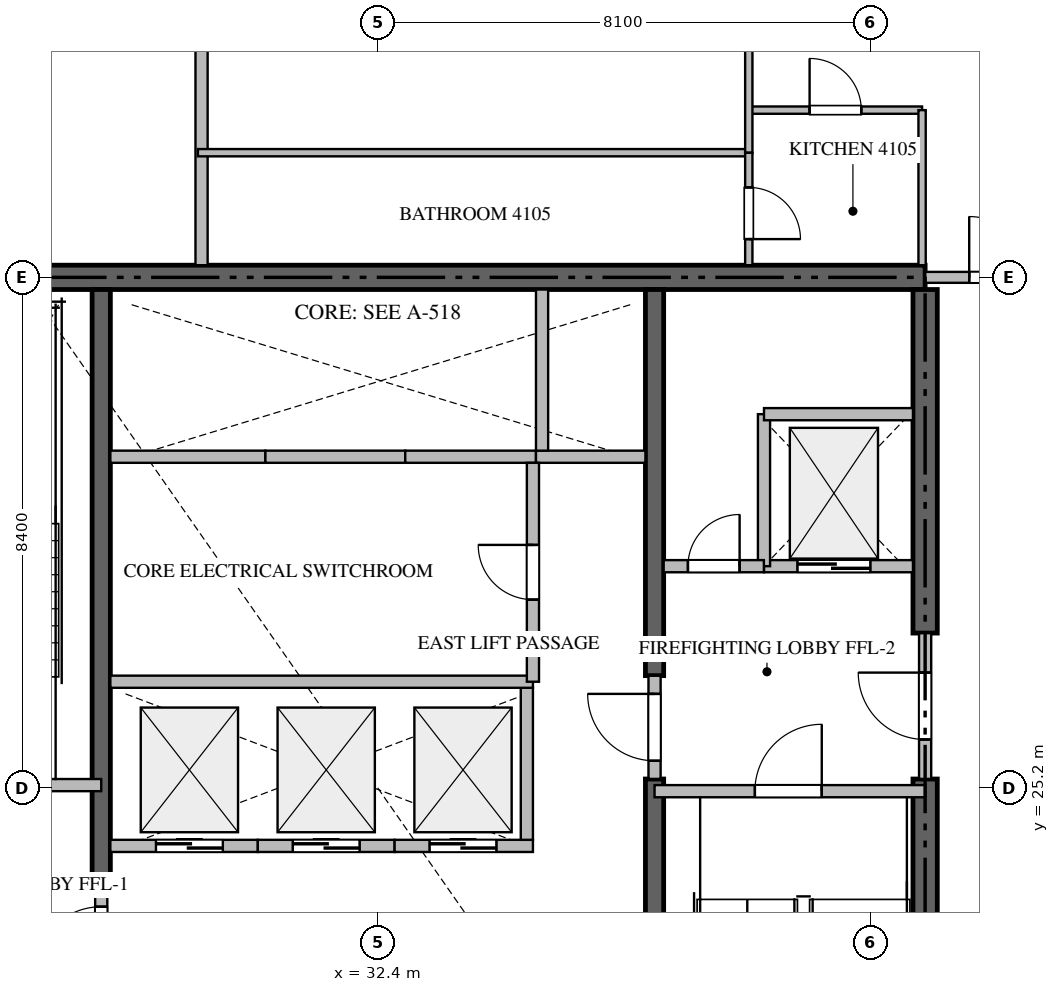
"""IFC4 building model, lengths in metres.
Left out: names, types, materials, properties, quantities, classifications, styles, units other than length and angle.
Written with IfcOpenShell. Run it as: python <this file> out.ifc"""

import sys

from ifc_helpers import new_model, si_unit, direction, frame, frame_2d, origin, place, context, subcontext, project, spatial, rectangle, extrude, source, transform, mapped, element, fill, save


model = new_model("IFC4")
c1 = context("Model", 3, precision=1e-05, world=origin(), true_north=direction((0.0, 1.0)))
c2 = subcontext(c1, "Body", "Model", "MODEL_VIEW")
j1 = project(units=[si_unit("LENGTHUNIT", "METRE"), si_unit("PLANEANGLEUNIT", "RADIAN")], contexts=[c1])
p1 = place(None, origin())
s1 = spatial("IfcSite", under=j1, at=p1, CompositionType="ELEMENT")
p2 = place(p1, origin())
s2 = spatial("IfcBuilding", under=s1, at=p2, CompositionType="ELEMENT")
p3 = place(p2, frame((0.0, 0.0, 165.15)))
s3 = spatial("IfcBuildingStorey", under=s2, at=p3, CompositionType="ELEMENT", Elevation=165.15)
p4 = place(p3, frame((41.4, 33.6, -0.26), z_axis=(0.0, 0.0, 1.0), x_axis=(-1.0, 0.0, 0.0)))
e1 = element("IfcWall", 1, at=p4, inside=s3, PredefinedType="SHEAR", context=c2, shape_type="SweptSolid", body=[
    extrude(rectangle(XDim=18.0, YDim=0.4, at=frame_2d((9.0, 0.0))), origin(), (0.0, 0.0, 1.0), 3.748),
])
p5 = place(p3, frame((41.4, 17.0, -0.26), z_axis=(0.0, 0.0, 1.0), x_axis=(0.0, 1.0, 0.0)))
e2 = element("IfcWall", 2, at=p5, inside=s3, PredefinedType="SHEAR", context=c2, shape_type="SweptSolid", body=[
    extrude(rectangle(XDim=8.35, YDim=0.4, at=frame_2d((4.175, 0.0))), origin(), (0.0, 0.0, 1.0), 3.748),
])
p6 = place(p3, frame((41.4, 27.75, -0.26), z_axis=(0.0, 0.0, 1.0), x_axis=(0.0, 1.0, 0.0)))
e3 = element("IfcWall", 3, at=p6, inside=s3, PredefinedType="SHEAR", context=c2, shape_type="SweptSolid", body=[
    extrude(rectangle(XDim=5.65, YDim=0.4, at=frame_2d((2.825, 0.0))), origin(), (0.0, 0.0, 1.0), 3.748),
])
p7 = place(p3, frame((27.85, 23.55, -0.26), z_axis=(0.0, 0.0, 1.0), x_axis=(0.0, 1.0, 0.0)))
e4 = element("IfcWall", 4, at=p7, inside=s3, PredefinedType="SHEAR", context=c2, shape_type="SweptSolid", body=[
    extrude(rectangle(XDim=9.85, YDim=0.3, at=frame_2d((4.925, 0.0))), origin(), (0.0, 0.0, 1.0), 3.748),
])
p8 = place(p3, frame((36.95, 17.0, -0.26), z_axis=(0.0, 0.0, 1.0), x_axis=(0.0, 1.0, 0.0)))
e5 = element("IfcWall", 5, at=p8, inside=s3, PredefinedType="SHEAR", context=c2, shape_type="SweptSolid", body=[
    extrude(rectangle(XDim=8.35, YDim=0.3, at=frame_2d((4.175, 0.0))), origin(), (0.0, 0.0, 1.0), 3.748),
])
p9 = place(p3, frame((36.95, 27.05, -0.26), z_axis=(0.0, 0.0, 1.0), x_axis=(0.0, 1.0, 0.0)))
e6 = element("IfcWall", 6, at=p9, inside=s3, PredefinedType="SHEAR", context=c2, shape_type="SweptSolid", body=[
    extrude(rectangle(XDim=6.35, YDim=0.3, at=frame_2d((3.175, 0.0))), origin(), (0.0, 0.0, 1.0), 3.748),
])
p10 = place(p3, frame((23.4, 25.25, 0.0), z_axis=(0.0, 0.0, 1.0), x_axis=(1.0, 0.0, 0.0)))
e7 = element("IfcWall", 7, at=p10, inside=s3, PredefinedType="STANDARD", context=c2, shape_type="SweptSolid", body=[
    extrude(rectangle(XDim=4.45, YDim=0.2, at=frame_2d((2.225, 0.0))), origin(), (0.0, 0.0, 1.0), 3.49),
])
p11 = place(p10, frame((1.65, 0.0, 0.0)))
e8 = element("IfcOpeningElement", 8, at=p11, cuts=e7, PredefinedType="OPENING", context=c2, shape_type="SweptSolid", body=[
    extrude(rectangle(XDim=1.1, YDim=2.15, at=frame_2d((0.55, 1.075))), frame((0.0, 0.11, 0.0), z_axis=(0.0, -1.0, 0.0), x_axis=(1.0, 0.0, 0.0)), (0.0, 0.0, 1.0), 0.22),
])
p12 = place(p3, frame((36.95, 25.15, 0.0), z_axis=(0.0, 0.0, 1.0), x_axis=(1.0, 0.0, 0.0)))
e9 = element("IfcWall", 9, at=p12, inside=s3, PredefinedType="STANDARD", context=c2, shape_type="SweptSolid", body=[
    extrude(rectangle(XDim=4.45, YDim=0.2, at=frame_2d((2.225, 0.0))), origin(), (0.0, 0.0, 1.0), 3.49),
])
p13 = place(p12, frame((1.65, 0.0, 0.0)))
e10 = element("IfcOpeningElement", 10, at=p13, cuts=e9, PredefinedType="OPENING", context=c2, shape_type="SweptSolid", body=[
    extrude(rectangle(XDim=1.1, YDim=2.15, at=frame_2d((0.55, 1.075))), frame((0.0, 0.11, 0.0), z_axis=(0.0, -1.0, 0.0), x_axis=(1.0, 0.0, 0.0)), (0.0, 0.0, 1.0), 0.22),
])
p14 = place(p3, frame((38.75, 28.85, 0.0), z_axis=(0.0, 0.0, 1.0), x_axis=(1.0, 0.0, 0.0)))
e11 = element("IfcWall", 11, at=p14, inside=s3, PredefinedType="STANDARD", context=c2, shape_type="SweptSolid", body=[
    extrude(rectangle(XDim=2.45, YDim=0.2, at=frame_2d((1.225, 0.0))), origin(), (0.0, 0.0, 1.0), 3.49),
])
p15 = place(p14, frame((0.55, 0.0, 0.0)))
e12 = element("IfcOpeningElement", 12, at=p15, cuts=e11, PredefinedType="OPENING", context=c2, shape_type="SweptSolid", body=[
    extrude(rectangle(XDim=1.2, YDim=2.2, at=frame_2d((0.6, 1.1))), frame((0.0, 0.11, 0.0), z_axis=(0.0, -1.0, 0.0), x_axis=(1.0, 0.0, 0.0)), (0.0, 0.0, 1.0), 0.22),
])
p16 = place(p3, frame((28.0, 24.25, 0.0), z_axis=(0.0, 0.0, 1.0), x_axis=(1.0, 0.0, 0.0)))
e13 = element("IfcWall", 13, at=p16, inside=s3, PredefinedType="STANDARD", context=c2, shape_type="SweptSolid", body=[
    extrude(rectangle(XDim=2.425, YDim=0.2, at=frame_2d((1.212, 0.0))), origin(), (0.0, 0.0, 1.0), 3.49),
])
p17 = place(p16, frame((0.75, 0.0, 0.0)))
e14 = element("IfcOpeningElement", 14, at=p17, cuts=e13, PredefinedType="OPENING", context=c2, shape_type="SweptSolid", body=[
    extrude(rectangle(XDim=1.1, YDim=2.2, at=frame_2d((0.55, 1.1))), frame((0.0, 0.11, 0.0), z_axis=(0.0, -1.0, 0.0), x_axis=(1.0, 0.0, 0.0)), (0.0, 0.0, 1.0), 0.22),
])
p18 = place(p3, frame((30.425, 24.25, 0.0), z_axis=(0.0, 0.0, 1.0), x_axis=(1.0, 0.0, 0.0)))
e15 = element("IfcWall", 15, at=p18, inside=s3, PredefinedType="STANDARD", context=c2, shape_type="SweptSolid", body=[
    extrude(rectangle(XDim=2.25, YDim=0.2, at=frame_2d((1.125, 0.0))), origin(), (0.0, 0.0, 1.0), 3.49),
])
p19 = place(p18, frame((0.575, 0.0, 0.0)))
e16 = element("IfcOpeningElement", 16, at=p19, cuts=e15, PredefinedType="OPENING", context=c2, shape_type="SweptSolid", body=[
    extrude(rectangle(XDim=1.1, YDim=2.2, at=frame_2d((0.55, 1.1))), frame((0.0, 0.11, 0.0), z_axis=(0.0, -1.0, 0.0), x_axis=(1.0, 0.0, 0.0)), (0.0, 0.0, 1.0), 0.22),
])
p20 = place(p3, frame((32.675, 24.25, 0.0), z_axis=(0.0, 0.0, 1.0), x_axis=(1.0, 0.0, 0.0)))
e17 = element("IfcWall", 17, at=p20, inside=s3, PredefinedType="STANDARD", context=c2, shape_type="SweptSolid", body=[
    extrude(rectangle(XDim=2.275, YDim=0.2, at=frame_2d((1.137, 0.0))), origin(), (0.0, 0.0, 1.0), 3.49),
])
p21 = place(p20, frame((0.575, 0.0, 0.0)))
e18 = element("IfcOpeningElement", 18, at=p21, cuts=e17, PredefinedType="OPENING", context=c2, shape_type="SweptSolid", body=[
    extrude(rectangle(XDim=1.1, YDim=2.2, at=frame_2d((0.55, 1.1))), frame((0.0, 0.11, 0.0), z_axis=(0.0, -1.0, 0.0), x_axis=(1.0, 0.0, 0.0)), (0.0, 0.0, 1.0), 0.22),
])
p22 = place(p3, frame((34.85, 24.35, 0.0), z_axis=(0.0, 0.0, 1.0), x_axis=(0.0, 1.0, 0.0)))
e19 = element("IfcWall", 19, at=p22, inside=s3, PredefinedType="STANDARD", context=c2, shape_type="SweptSolid", body=[
    extrude(rectangle(XDim=2.5, YDim=0.2, at=frame_2d((1.25, 0.0))), origin(), (0.0, 0.0, 1.0), 3.49),
])
p23 = place(p3, frame((28.0, 30.65, 0.0), z_axis=(0.0, 0.0, 1.0), x_axis=(1.0, 0.0, 0.0)))
e20 = element("IfcWall", 20, at=p23, inside=s3, PredefinedType="STANDARD", context=c2, shape_type="SweptSolid", body=[
    extrude(rectangle(XDim=2.55, YDim=0.2, at=frame_2d((1.275, 0.0))), origin(), (0.0, 0.0, 1.0), 3.49),
])
p24 = place(p3, frame((30.55, 30.65, 0.0), z_axis=(0.0, 0.0, 1.0), x_axis=(1.0, 0.0, 0.0)))
e21 = element("IfcWall", 21, at=p24, inside=s3, PredefinedType="STANDARD", context=c2, shape_type="SweptSolid", body=[
    extrude(rectangle(XDim=2.3, YDim=0.2, at=frame_2d((1.15, 0.0))), origin(), (0.0, 0.0, 1.0), 3.49),
])
p25 = place(p3, frame((32.85, 30.65, 0.0), z_axis=(0.0, 0.0, 1.0), x_axis=(1.0, 0.0, 0.0)))
e22 = element("IfcWall", 22, at=p25, inside=s3, PredefinedType="STANDARD", context=c2, shape_type="SweptSolid", body=[
    extrude(rectangle(XDim=2.15, YDim=0.2, at=frame_2d((1.075, 0.0))), origin(), (0.0, 0.0, 1.0), 3.49),
])
p26 = place(p3, frame((35.0, 30.65, 0.0), z_axis=(0.0, 0.0, 1.0), x_axis=(1.0, 0.0, 0.0)))
e23 = element("IfcWall", 23, at=p26, inside=s3, PredefinedType="STANDARD", context=c2, shape_type="SweptSolid", body=[
    extrude(rectangle(XDim=1.8, YDim=0.2, at=frame_2d((0.9, 0.0))), origin(), (0.0, 0.0, 1.0), 3.49),
])
p27 = place(p3, frame((35.1, 30.75, 0.0), z_axis=(0.0, 0.0, 1.0), x_axis=(0.0, 1.0, 0.0)))
e24 = element("IfcWall", 24, at=p27, inside=s3, PredefinedType="STANDARD", context=c2, shape_type="SweptSolid", body=[
    extrude(rectangle(XDim=2.65, YDim=0.2, at=frame_2d((1.325, 0.0))), origin(), (0.0, 0.0, 1.0), 3.49),
])
p28 = place(p3, frame((38.75, 28.85, 0.0), z_axis=(0.0, 0.0, 1.0), x_axis=(0.0, 1.0, 0.0)))
e25 = element("IfcWall", 25, at=p28, inside=s3, PredefinedType="STANDARD", context=c2, shape_type="SweptSolid", body=[
    extrude(rectangle(XDim=2.5, YDim=0.2, at=frame_2d((1.25, 0.0))), origin(), (0.0, 0.0, 1.0), 3.49),
])
p29 = place(p3, frame((38.75, 31.35, 0.0), z_axis=(0.0, 0.0, 1.0), x_axis=(1.0, 0.0, 0.0)))
e26 = element("IfcWall", 26, at=p29, inside=s3, PredefinedType="STANDARD", context=c2, shape_type="SweptSolid", body=[
    extrude(rectangle(XDim=2.45, YDim=0.2, at=frame_2d((1.225, 0.0))), origin(), (0.0, 0.0, 1.0), 3.49),
])
p30 = place(p3, frame((37.1, 28.85, 0.0), z_axis=(0.0, 0.0, 1.0), x_axis=(1.0, 0.0, 0.0)))
e27 = element("IfcWall", 27, at=p30, inside=s3, PredefinedType="STANDARD", context=c2, shape_type="SweptSolid", body=[
    extrude(rectangle(XDim=1.648, YDim=0.2, at=frame_2d((0.824, 0.0))), origin(), (0.0, 0.0, 1.0), 3.49),
])
p31 = place(p30, frame((0.399, 0.0, 0.0)))
e28 = element("IfcOpeningElement", 28, at=p31, cuts=e27, PredefinedType="OPENING", context=c2, shape_type="SweptSolid", body=[
    extrude(rectangle(XDim=0.85, YDim=2.1, at=frame_2d((0.425, 1.05))), frame((0.0, 0.11, 0.0), z_axis=(0.0, -1.0, 0.0), x_axis=(1.0, 0.0, 0.0)), (0.0, 0.0, 1.0), 0.22),
])
p32 = place(p3, frame((41.4, 25.352, 0.0), z_axis=(0.0, 0.0, 1.0), x_axis=(0.0, 1.0, 0.0)))
e29 = element("IfcWall", 29, at=p32, inside=s3, PredefinedType="STANDARD", context=c2, shape_type="SweptSolid", body=[
    extrude(rectangle(XDim=2.396, YDim=0.2, at=frame_2d((1.198, 0.0))), origin(), (0.0, 0.0, 1.0), 3.49),
])
p33 = place(p32, frame((0.648, 0.0, 0.0)))
e30 = element("IfcOpeningElement", 30, at=p33, cuts=e29, PredefinedType="OPENING", context=c2, shape_type="SweptSolid", body=[
    extrude(rectangle(XDim=1.1, YDim=2.15, at=frame_2d((0.55, 1.075))), frame((0.0, 0.11, 0.0), z_axis=(0.0, -1.0, 0.0), x_axis=(1.0, 0.0, 0.0)), (0.0, 0.0, 1.0), 0.22),
])
p34 = place(p3, frame((27.85, 21.852, 0.0), z_axis=(0.0, 0.0, 1.0), x_axis=(0.0, 1.0, 0.0)))
e31 = element("IfcWall", 31, at=p34, inside=s3, PredefinedType="STANDARD", context=c2, shape_type="SweptSolid", body=[
    extrude(rectangle(XDim=1.696, YDim=0.2, at=frame_2d((0.848, 0.0))), origin(), (0.0, 0.0, 1.0), 3.49),
])
p35 = place(p34, frame((0.298, 0.0, 0.0)))
e32 = element("IfcOpeningElement", 32, at=p35, cuts=e31, PredefinedType="OPENING", context=c2, shape_type="SweptSolid", body=[
    extrude(rectangle(XDim=1.1, YDim=2.15, at=frame_2d((0.55, 1.075))), frame((0.0, 0.11, 0.0), z_axis=(0.0, -1.0, 0.0), x_axis=(1.0, 0.0, 0.0)), (0.0, 0.0, 1.0), 0.22),
])
p36 = place(p3, frame((36.95, 25.352, 0.0), z_axis=(0.0, 0.0, 1.0), x_axis=(0.0, 1.0, 0.0)))
e33 = element("IfcWall", 33, at=p36, inside=s3, PredefinedType="STANDARD", context=c2, shape_type="SweptSolid", body=[
    extrude(rectangle(XDim=1.696, YDim=0.2, at=frame_2d((0.848, 0.0))), origin(), (0.0, 0.0, 1.0), 3.49),
])
p37 = place(p36, frame((0.298, 0.0, 0.0)))
e34 = element("IfcOpeningElement", 34, at=p37, cuts=e33, PredefinedType="OPENING", context=c2, shape_type="SweptSolid", body=[
    extrude(rectangle(XDim=1.1, YDim=2.15, at=frame_2d((0.55, 1.075))), frame((0.0, 0.11, 0.0), z_axis=(0.0, -1.0, 0.0), x_axis=(1.0, 0.0, 0.0)), (0.0, 0.0, 1.0), 0.22),
])
p38 = place(p3, frame((28.0, 26.95, 0.0), z_axis=(0.0, 0.0, 1.0), x_axis=(1.0, 0.0, 0.0)))
e35 = element("IfcWall", 35, at=p38, inside=s3, PredefinedType="STANDARD", context=c2, shape_type="SweptSolid", body=[
    extrude(rectangle(XDim=6.95, YDim=0.2, at=frame_2d((3.475, 0.0))), origin(), (0.0, 0.0, 1.0), 3.49),
])
p39 = place(p3, frame((34.95, 26.95, 0.0), z_axis=(0.0, 0.0, 1.0), x_axis=(0.0, 1.0, 0.0)))
e36 = element("IfcWall", 36, at=p39, inside=s3, PredefinedType="STANDARD", context=c2, shape_type="SweptSolid", body=[
    extrude(rectangle(XDim=3.6, YDim=0.2, at=frame_2d((1.8, 0.0))), origin(), (0.0, 0.0, 1.0), 3.49),
])
p40 = place(p39, frame((1.35, 0.0, 0.0)))
e37 = element("IfcOpeningElement", 37, at=p40, cuts=e36, PredefinedType="OPENING", context=c2, shape_type="SweptSolid", body=[
    extrude(rectangle(XDim=0.9, YDim=2.1, at=frame_2d((0.45, 1.05))), frame((0.0, 0.11, 0.0), z_axis=(0.0, -1.0, 0.0), x_axis=(1.0, 0.0, 0.0)), (0.0, 0.0, 1.0), 0.22),
])
p41 = place(p3, frame((29.5, 33.8, 0.0), z_axis=(0.0, 0.0, 1.0), x_axis=(0.0, 1.0, 0.0)))
e38 = element("IfcWall", 38, at=p41, inside=s3, PredefinedType="PARTITIONING", context=c2, shape_type="SweptSolid", body=[
    extrude(rectangle(XDim=15.118, YDim=0.2, at=frame_2d((7.559, 0.0))), origin(), (0.0, 0.0, 1.0), 3.49),
])
p42 = place(p3, frame((41.402, 33.6, 0.0), z_axis=(0.0, 0.0, 1.0), x_axis=(1.0, 0.0, 0.0)))
e39 = element("IfcWall", 39, at=p42, inside=s3, PredefinedType="PARTITIONING", context=c2, shape_type="SweptSolid", body=[
    extrude(rectangle(XDim=2.446, YDim=0.18, at=frame_2d((1.223, 0.0))), origin(), (0.0, 0.0, 1.0), 3.49),
])
p43 = place(p42, frame((0.723, 0.0, 0.0)))
e40 = element("IfcOpeningElement", 40, at=p43, cuts=e39, PredefinedType="OPENING", context=c2, shape_type="SweptSolid", body=[
    extrude(rectangle(XDim=1.0, YDim=2.15, at=frame_2d((0.5, 1.075))), frame((0.0, 0.1, 0.0), z_axis=(0.0, -1.0, 0.0), x_axis=(1.0, 0.0, 0.0)), (0.0, 0.0, 1.0), 0.2),
])
p44 = place(p3, frame((38.5, 36.35, 0.0), z_axis=(0.0, 0.0, 1.0), x_axis=(1.0, 0.0, 0.0)))
e41 = element("IfcWall", 41, at=p44, inside=s3, PredefinedType="PARTITIONING", context=c2, shape_type="SweptSolid", body=[
    extrude(rectangle(XDim=2.85, YDim=0.12, at=frame_2d((1.425, 0.0))), origin(), (0.0, 0.0, 1.0), 3.49),
])
p45 = place(p44, frame((1.0, 0.0, 0.0)))
e42 = element("IfcOpeningElement", 42, at=p45, cuts=e41, PredefinedType="OPENING", context=c2, shape_type="SweptSolid", body=[
    extrude(rectangle(XDim=0.85, YDim=2.1, at=frame_2d((0.425, 1.05))), frame((0.0, 0.07, 0.0), z_axis=(0.0, -1.0, 0.0), x_axis=(1.0, 0.0, 0.0)), (0.0, 0.0, 1.0), 0.14),
])
p46 = place(p3, frame((41.35, 36.35, 0.0), z_axis=(0.0, 0.0, 1.0), x_axis=(0.0, -1.0, 0.0)))
e43 = element("IfcWall", 43, at=p46, inside=s3, PredefinedType="PARTITIONING", context=c2, shape_type="SweptSolid", body=[
    extrude(rectangle(XDim=2.55, YDim=0.12, at=frame_2d((1.275, 0.0))), origin(), (0.0, 0.0, 1.0), 3.49),
])
p47 = place(p3, frame((29.44, 35.65, 0.0), z_axis=(0.0, 0.0, 1.0), x_axis=(1.0, 0.0, 0.0)))
e44 = element("IfcWall", 44, at=p47, inside=s3, PredefinedType="PARTITIONING", context=c2, shape_type="SweptSolid", body=[
    extrude(rectangle(XDim=9.06, YDim=0.12, at=frame_2d((4.53, 0.0))), origin(), (0.0, 0.0, 1.0), 3.49),
])
p48 = place(p3, frame((38.5, 44.178, 0.0), z_axis=(0.0, 0.0, 1.0), x_axis=(0.0, -1.0, 0.0)))
e45 = element("IfcWall", 45, at=p48, inside=s3, PredefinedType="PARTITIONING", context=c2, shape_type="SweptSolid", body=[
    extrude(rectangle(XDim=8.528, YDim=0.12, at=frame_2d((4.264, 0.0))), origin(), (0.0, 0.0, 1.0), 3.49),
])
p49 = place(p48, frame((3.839, 0.0, 0.0)))
e46 = element("IfcOpeningElement", 46, at=p49, cuts=e45, PredefinedType="OPENING", context=c2, shape_type="SweptSolid", body=[
    extrude(rectangle(XDim=0.85, YDim=2.1, at=frame_2d((0.425, 1.05))), frame((0.0, 0.07, 0.0), z_axis=(0.0, -1.0, 0.0), x_axis=(1.0, 0.0, 0.0)), (0.0, 0.0, 1.0), 0.14),
])
p50 = place(p3, frame((38.5, 35.648, 0.0), z_axis=(0.0, 0.0, 1.0), x_axis=(0.0, -1.0, 0.0)))
e47 = element("IfcWall", 47, at=p50, inside=s3, PredefinedType="PARTITIONING", context=c2, shape_type="SweptSolid", body=[
    extrude(rectangle(XDim=1.848, YDim=0.12, at=frame_2d((0.924, 0.0))), origin(), (0.0, 0.0, 1.0), 3.49),
])
p51 = place(p50, frame((0.569, 0.0, 0.0)))
e48 = element("IfcOpeningElement", 48, at=p51, cuts=e47, PredefinedType="OPENING", context=c2, shape_type="SweptSolid", body=[
    extrude(rectangle(XDim=0.85, YDim=2.1, at=frame_2d((0.425, 1.05))), frame((0.0, 0.07, 0.0), z_axis=(0.0, -1.0, 0.0), x_axis=(1.0, 0.0, 0.0)), (0.0, 0.0, 1.0), 0.14),
])
m1 = source(origin(), c2, "Body", "SweptSolid", [
    extrude(rectangle(XDim=1.1, YDim=2.15, at=frame_2d((0.55, 1.075))), frame((0.0, 0.025, 0.0), z_axis=(0.0, -1.0, 0.0), x_axis=(1.0, 0.0, 0.0)), (0.0, 0.0, 1.0), 0.05),
])
p52 = place(p13, origin())
e49 = element("IfcDoor", 49, at=p52, inside=s3, OperationType="SINGLE_SWING_RIGHT", PredefinedType="DOOR", context=c2, shape_type="MappedRepresentation", body=[
    mapped(m1, transform((0.0, 0.0, 0.0), scale=1.0)),
])
fill(e10, e49)
m2 = source(origin(), c2, "Body", "SweptSolid", [
    extrude(rectangle(XDim=1.2, YDim=2.2, at=frame_2d((0.6, 1.1))), frame((0.0, 0.025, 0.0), z_axis=(0.0, -1.0, 0.0), x_axis=(1.0, 0.0, 0.0)), (0.0, 0.0, 1.0), 0.05),
])
p53 = place(p15, origin())
e50 = element("IfcDoor", 50, at=p53, inside=s3, OperationType="DOUBLE_DOOR_SLIDING", PredefinedType="DOOR", context=c2, shape_type="MappedRepresentation", body=[
    mapped(m2, transform((0.0, 0.0, 0.0), scale=1.0)),
])
fill(e12, e50)
m3 = source(origin(), c2, "Body", "SweptSolid", [
    extrude(rectangle(XDim=1.1, YDim=2.2, at=frame_2d((0.55, 1.1))), frame((0.0, 0.025, 0.0), z_axis=(0.0, -1.0, 0.0), x_axis=(1.0, 0.0, 0.0)), (0.0, 0.0, 1.0), 0.05),
])
p54 = place(p17, origin())
e51 = element("IfcDoor", 51, at=p54, inside=s3, OperationType="DOUBLE_DOOR_SLIDING", PredefinedType="DOOR", context=c2, shape_type="MappedRepresentation", body=[
    mapped(m3, transform((0.0, 0.0, 0.0), scale=1.0)),
])
fill(e14, e51)
p55 = place(p19, origin())
e52 = element("IfcDoor", 52, at=p55, inside=s3, OperationType="DOUBLE_DOOR_SLIDING", PredefinedType="DOOR", context=c2, shape_type="MappedRepresentation", body=[
    mapped(m3, transform((0.0, 0.0, 0.0), scale=1.0)),
])
fill(e16, e52)
p56 = place(p21, origin())
e53 = element("IfcDoor", 53, at=p56, inside=s3, OperationType="DOUBLE_DOOR_SLIDING", PredefinedType="DOOR", context=c2, shape_type="MappedRepresentation", body=[
    mapped(m3, transform((0.0, 0.0, 0.0), scale=1.0)),
])
fill(e18, e53)
m4 = source(origin(), c2, "Body", "SweptSolid", [
    extrude(rectangle(XDim=0.85, YDim=2.1, at=frame_2d((0.425, 1.05))), frame((0.0, 0.025, 0.0), z_axis=(0.0, -1.0, 0.0), x_axis=(1.0, 0.0, 0.0)), (0.0, 0.0, 1.0), 0.05),
])
p57 = place(p31, origin())
e54 = element("IfcDoor", 54, at=p57, inside=s3, OperationType="SINGLE_SWING_RIGHT", PredefinedType="DOOR", context=c2, shape_type="MappedRepresentation", body=[
    mapped(m4, transform((0.0, 0.0, 0.0), scale=1.0)),
])
fill(e28, e54)
p58 = place(p33, origin())
e55 = element("IfcDoor", 55, at=p58, inside=s3, OperationType="SINGLE_SWING_RIGHT", PredefinedType="DOOR", context=c2, shape_type="MappedRepresentation", body=[
    mapped(m1, transform((0.0, 0.0, 0.0), scale=1.0)),
])
fill(e30, e55)
p59 = place(p35, origin())
e56 = element("IfcDoor", 56, at=p59, inside=s3, OperationType="SINGLE_SWING_LEFT", PredefinedType="DOOR", context=c2, shape_type="MappedRepresentation", body=[
    mapped(m1, transform((0.0, 0.0, 0.0), scale=1.0)),
])
fill(e32, e56)
p60 = place(p37, origin())
e57 = element("IfcDoor", 57, at=p60, inside=s3, OperationType="SINGLE_SWING_RIGHT", PredefinedType="DOOR", context=c2, shape_type="MappedRepresentation", body=[
    mapped(m1, transform((0.0, 0.0, 0.0), scale=1.0)),
])
fill(e34, e57)
m5 = source(origin(), c2, "Body", "SweptSolid", [
    extrude(rectangle(XDim=0.9, YDim=2.1, at=frame_2d((0.45, 1.05))), frame((0.0, 0.025, 0.0), z_axis=(0.0, -1.0, 0.0), x_axis=(1.0, 0.0, 0.0)), (0.0, 0.0, 1.0), 0.05),
])
p61 = place(p40, origin())
e58 = element("IfcDoor", 58, at=p61, inside=s3, OperationType="SINGLE_SWING_RIGHT", PredefinedType="DOOR", context=c2, shape_type="MappedRepresentation", body=[
    mapped(m5, transform((0.0, 0.0, 0.0), scale=1.0)),
])
fill(e37, e58)
m6 = source(origin(), c2, "Body", "SweptSolid", [
    extrude(rectangle(XDim=1.0, YDim=2.15, at=frame_2d((0.5, 1.075))), frame((0.0, 0.025, 0.0), z_axis=(0.0, -1.0, 0.0), x_axis=(1.0, 0.0, 0.0)), (0.0, 0.0, 1.0), 0.05),
])
p62 = place(p43, origin())
e59 = element("IfcDoor", 59, at=p62, inside=s3, OperationType="SINGLE_SWING_LEFT", PredefinedType="DOOR", context=c2, shape_type="MappedRepresentation", body=[
    mapped(m6, transform((0.0, 0.0, 0.0), scale=1.0)),
])
fill(e40, e59)
p63 = place(p45, origin())
e60 = element("IfcDoor", 60, at=p63, inside=s3, OperationType="SINGLE_SWING_LEFT", PredefinedType="DOOR", context=c2, shape_type="MappedRepresentation", body=[
    mapped(m4, transform((0.0, 0.0, 0.0), scale=1.0)),
])
fill(e42, e60)
p64 = place(p51, origin())
e61 = element("IfcDoor", 61, at=p64, inside=s3, OperationType="SINGLE_SWING_RIGHT", PredefinedType="DOOR", context=c2, shape_type="MappedRepresentation", body=[
    mapped(m4, transform((0.0, 0.0, 0.0), scale=1.0)),
])
fill(e48, e61)
save(model, sys.argv[1])
